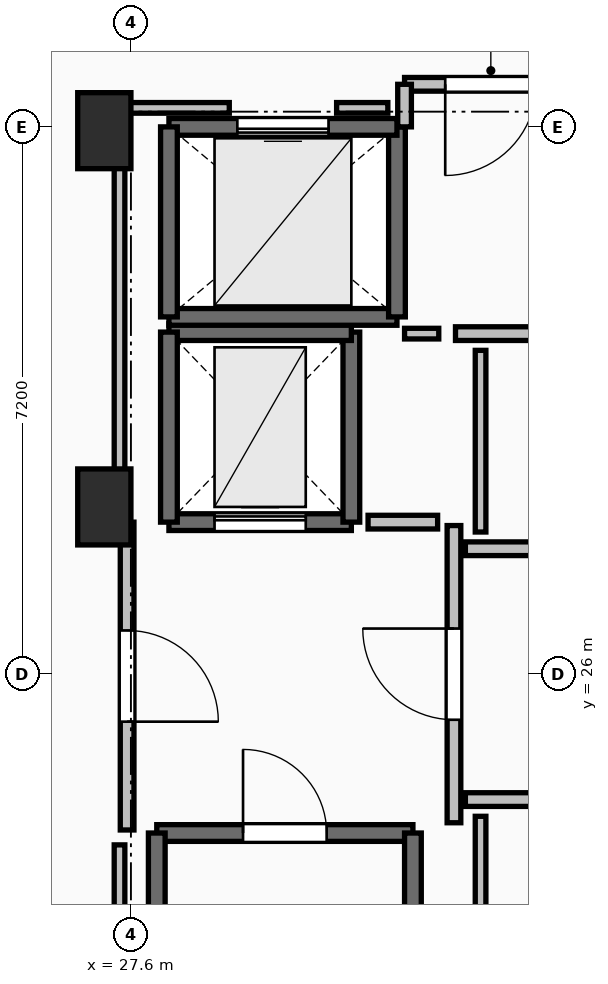
"""IFC4 building model, lengths in metres.
Left out: names, types, materials, properties, quantities, classifications, styles, units other than length and angle.
Written with IfcOpenShell. Run it as: python <this file> out.ifc"""

import sys

from ifc_helpers import new_model, si_unit, direction, frame, frame_2d, origin, origin_2d, place, context, subcontext, project, spatial, rectangle, extrude, element, fill, save


model = new_model("IFC4")
c1 = context("Model", 3, precision=1e-05, world=origin(), true_north=direction((0.0, 1.0)))
c2 = subcontext(c1, "Body", "Model", "MODEL_VIEW")
j1 = project(units=[si_unit("LENGTHUNIT", "METRE"), si_unit("PLANEANGLEUNIT", "RADIAN")], contexts=[c1])
p1 = place(None, origin())
s1 = spatial("IfcSite", under=j1, at=p1, CompositionType="ELEMENT")
p2 = place(p1, origin())
s2 = spatial("IfcBuilding", under=s1, at=p2, CompositionType="ELEMENT")
p3 = place(p2, frame((0.0, 0.0, 241.35)))
s3 = spatial("IfcBuildingStorey", under=s2, at=p3, CompositionType="ELEMENT", Elevation=241.35)
for number, where, z_axis, x_axis in (
    (1, (27.25, 28.2, 0.0), (0.0, 0.0, 1.0), (1.0, 0.0, 0.0)),
    (2, (27.25, 33.15, 0.0), (0.0, 0.0, 1.0), (1.0, 0.0, 0.0)),
):
    element("IfcColumn", number, at=place(p3, frame(where, z_axis=z_axis, x_axis=x_axis)), inside=s3, PredefinedType="PILASTER", context=c2, shape_type="SweptSolid", body=[
        extrude(rectangle(XDim=0.7, YDim=1.0, at=origin_2d()), origin(), (0.0, 0.0, 1.0), 3.55),
    ])
p4 = place(p3, frame((27.94, 23.91, 0.0), z_axis=(0.0, 0.0, 1.0), x_axis=(1.0, 0.0, 0.0)))
e3 = element("IfcWall", 3, at=p4, inside=s3, PredefinedType="SOLIDWALL", context=c2, shape_type="SweptSolid", body=[
    extrude(rectangle(XDim=3.37, YDim=0.22, at=frame_2d((1.685, 0.0))), origin(), (0.0, 0.0, 1.0), 3.29),
])
p5 = place(p4, frame((1.135, 0.0, 0.0)))
e4 = element("IfcOpeningElement", 4, at=p5, cuts=e3, PredefinedType="OPENING", context=c2, shape_type="SweptSolid", body=[
    extrude(rectangle(XDim=1.1, YDim=2.15, at=frame_2d((0.55, 1.075))), frame((0.0, 0.125, 0.0), z_axis=(0.0, -1.0, 0.0), x_axis=(1.0, 0.0, 0.0)), (0.0, 0.0, 1.0), 0.25),
])
for number, where, z_axis, x_axis in (
    (5, (31.31, 23.91, 0.0), (0.0, 0.0, 1.0), (0.0, -1.0, 0.0)),
    (6, (27.94, 16.49, 0.0), (0.0, 0.0, 1.0), (0.0, 1.0, 0.0)),
):
    element("IfcWall", number, at=place(p3, frame(where, z_axis=z_axis, x_axis=x_axis)), inside=s3, PredefinedType="SOLIDWALL", context=c2, shape_type="SweptSolid", body=[
        extrude(rectangle(XDim=7.42, YDim=0.22, at=frame_2d((3.71, 0.0))), origin(), (0.0, 0.0, 1.0), 3.29),
    ])
p6 = place(p3, frame((28.1, 28.0, 0.0), z_axis=(0.0, 0.0, 1.0), x_axis=(1.0, 0.0, 0.0)))
e7 = element("IfcWall", 7, at=p6, inside=s3, PredefinedType="SHEAR", context=c2, shape_type="SweptSolid", body=[
    extrude(rectangle(XDim=2.4, YDim=0.22, at=frame_2d((1.2, 0.0))), origin(), (0.0, 0.0, 1.0), 3.29),
])
p7 = place(p6, frame((0.6, 0.0, 0.0)))
e8 = element("IfcOpeningElement", 8, at=p7, cuts=e7, PredefinedType="OPENING", context=c2, shape_type="SweptSolid", body=[
    extrude(rectangle(XDim=1.2, YDim=2.2, at=frame_2d((0.6, 1.1))), frame((0.0, 0.125, 0.0), z_axis=(0.0, -1.0, 0.0), x_axis=(1.0, 0.0, 0.0)), (0.0, 0.0, 1.0), 0.25),
])
p8 = place(p3, frame((30.5, 28.0, 0.0), z_axis=(0.0, 0.0, 1.0), x_axis=(0.0, 1.0, 0.0)))
e9 = element("IfcWall", 9, at=p8, inside=s3, PredefinedType="SHEAR", context=c2, shape_type="SweptSolid", body=[
    extrude(rectangle(XDim=2.5, YDim=0.22, at=frame_2d((1.25, 0.0))), origin(), (0.0, 0.0, 1.0), 3.29),
])
p9 = place(p3, frame((30.5, 30.5, 0.0), z_axis=(0.0, 0.0, 1.0), x_axis=(-1.0, 0.0, 0.0)))
e10 = element("IfcWall", 10, at=p9, inside=s3, PredefinedType="SHEAR", context=c2, shape_type="SweptSolid", body=[
    extrude(rectangle(XDim=2.4, YDim=0.22, at=frame_2d((1.2, 0.0))), origin(), (0.0, 0.0, 1.0), 3.29),
])
p10 = place(p3, frame((28.1, 30.5, 0.0), z_axis=(0.0, 0.0, 1.0), x_axis=(0.0, -1.0, 0.0)))
e11 = element("IfcWall", 11, at=p10, inside=s3, PredefinedType="SHEAR", context=c2, shape_type="SweptSolid", body=[
    extrude(rectangle(XDim=2.5, YDim=0.22, at=frame_2d((1.25, 0.0))), origin(), (0.0, 0.0, 1.0), 3.29),
])
p11 = place(p3, frame((28.1, 30.7, 0.0), z_axis=(0.0, 0.0, 1.0), x_axis=(1.0, 0.0, 0.0)))
e12 = element("IfcWall", 12, at=p11, inside=s3, PredefinedType="SOLIDWALL", context=c2, shape_type="SweptSolid", body=[
    extrude(rectangle(XDim=3.0, YDim=0.22, at=frame_2d((1.5, 0.0))), origin(), (0.0, 0.0, 1.0), 3.29),
])
p12 = place(p3, frame((31.1, 30.7, 0.0), z_axis=(0.0, 0.0, 1.0), x_axis=(0.0, 1.0, 0.0)))
e13 = element("IfcWall", 13, at=p12, inside=s3, PredefinedType="SOLIDWALL", context=c2, shape_type="SweptSolid", body=[
    extrude(rectangle(XDim=2.5, YDim=0.22, at=frame_2d((1.25, 0.0))), origin(), (0.0, 0.0, 1.0), 3.29),
])
p13 = place(p3, frame((31.1, 33.2, 0.0), z_axis=(0.0, 0.0, 1.0), x_axis=(-1.0, 0.0, 0.0)))
e14 = element("IfcWall", 14, at=p13, inside=s3, PredefinedType="SOLIDWALL", context=c2, shape_type="SweptSolid", body=[
    extrude(rectangle(XDim=3.0, YDim=0.22, at=frame_2d((1.5, 0.0))), origin(), (0.0, 0.0, 1.0), 3.29),
])
p14 = place(p13, frame((0.9, 0.0, 0.0)))
e15 = element("IfcOpeningElement", 15, at=p14, cuts=e14, PredefinedType="OPENING", context=c2, shape_type="SweptSolid", body=[
    extrude(rectangle(XDim=1.2, YDim=2.2, at=frame_2d((0.6, 1.1))), frame((0.0, 0.125, 0.0), z_axis=(0.0, -1.0, 0.0), x_axis=(1.0, 0.0, 0.0)), (0.0, 0.0, 1.0), 0.25),
])
p15 = place(p3, frame((28.1, 33.2, 0.0), z_axis=(0.0, 0.0, 1.0), x_axis=(0.0, -1.0, 0.0)))
e16 = element("IfcWall", 16, at=p15, inside=s3, PredefinedType="SOLIDWALL", context=c2, shape_type="SweptSolid", body=[
    extrude(rectangle(XDim=2.5, YDim=0.22, at=frame_2d((1.25, 0.0))), origin(), (0.0, 0.0, 1.0), 3.29),
])
p16 = place(p3, frame((31.85, 24.045, 0.0), z_axis=(0.0, 0.0, 1.0), x_axis=(0.0, 1.0, 0.0)))
e17 = element("IfcWall", 17, at=p16, inside=s3, PredefinedType="PARTITIONING", context=c2, shape_type="SweptSolid", body=[
    extrude(rectangle(XDim=3.91, YDim=0.18, at=frame_2d((1.955, 0.0))), origin(), (0.0, 0.0, 1.0), 3.29),
])
p17 = place(p16, frame((1.355, 0.0, 0.0)))
e18 = element("IfcOpeningElement", 18, at=p17, cuts=e17, PredefinedType="OPENING", context=c2, shape_type="SweptSolid", body=[
    extrude(rectangle(XDim=1.2, YDim=2.15, at=frame_2d((0.6, 1.075))), frame((0.0, 0.105, 0.0), z_axis=(0.0, -1.0, 0.0), x_axis=(1.0, 0.0, 0.0)), (0.0, 0.0, 1.0), 0.21),
])
p18 = place(p3, frame((27.55, 28.0, 0.0), z_axis=(0.0, 0.0, 1.0), x_axis=(0.0, -1.0, 0.0)))
e19 = element("IfcWall", 19, at=p18, inside=s3, PredefinedType="PARTITIONING", context=c2, shape_type="SweptSolid", body=[
    extrude(rectangle(XDim=4.05, YDim=0.18, at=frame_2d((2.025, 0.0))), origin(), (0.0, 0.0, 1.0), 3.29),
])
p19 = place(p18, frame((1.425, 0.0, 0.0)))
e20 = element("IfcOpeningElement", 20, at=p19, cuts=e19, PredefinedType="OPENING", context=c2, shape_type="SweptSolid", body=[
    extrude(rectangle(XDim=1.2, YDim=2.15, at=frame_2d((0.6, 1.075))), frame((0.0, 0.105, 0.0), z_axis=(0.0, -1.0, 0.0), x_axis=(1.0, 0.0, 0.0)), (0.0, 0.0, 1.0), 0.21),
])
p20 = place(p3, frame((31.87, 30.48, 0.0), z_axis=(0.0, 0.0, 1.0), x_axis=(1.0, 0.0, 0.0)))
e21 = element("IfcWall", 21, at=p20, inside=s3, PredefinedType="PARTITIONING", context=c2, shape_type="SweptSolid", body=[
    extrude(rectangle(XDim=1.6, YDim=0.18, at=frame_2d((0.8, 0.0))), origin(), (0.0, 0.0, 1.0), 3.29),
])
p21 = place(p3, frame((33.47, 33.76, 0.0), z_axis=(0.0, 0.0, 1.0), x_axis=(-1.0, 0.0, 0.0)))
e22 = element("IfcWall", 22, at=p21, inside=s3, PredefinedType="PARTITIONING", context=c2, shape_type="SweptSolid", body=[
    extrude(rectangle(XDim=2.27, YDim=0.18, at=frame_2d((1.135, 0.0))), origin(), (0.0, 0.0, 1.0), 3.29),
])
p22 = place(p21, frame((0.535, 0.0, 0.0)))
e23 = element("IfcOpeningElement", 23, at=p22, cuts=e22, PredefinedType="OPENING", context=c2, shape_type="SweptSolid", body=[
    extrude(rectangle(XDim=1.2, YDim=2.15, at=frame_2d((0.6, 1.075))), frame((0.0, 0.105, 0.0), z_axis=(0.0, -1.0, 0.0), x_axis=(1.0, 0.0, 0.0)), (0.0, 0.0, 1.0), 0.21),
])
p23 = place(p3, frame((31.2, 33.76, 0.0), z_axis=(0.0, 0.0, 1.0), x_axis=(0.0, -1.0, 0.0)))
e24 = element("IfcWall", 24, at=p23, inside=s3, PredefinedType="PARTITIONING", context=c2, shape_type="SweptSolid", body=[
    extrude(rectangle(XDim=0.56, YDim=0.18, at=frame_2d((0.28, 0.0))), origin(), (0.0, 0.0, 1.0), 3.29),
])
p24 = place(p3, frame((39.19, 27.65, 0.0), z_axis=(0.0, 0.0, 1.0), x_axis=(-1.0, 0.0, 0.0)))
e25 = element("IfcWall", 25, at=p24, inside=s3, PredefinedType="PARTITIONING", context=c2, shape_type="SweptSolid", body=[
    extrude(rectangle(XDim=7.19, YDim=0.18, at=frame_2d((3.595, 0.0))), origin(), (0.0, 0.0, 1.0), 3.29),
])
p25 = place(p24, frame((3.095, 0.0, 0.0)))
e26 = element("IfcOpeningElement", 26, at=p25, cuts=e25, PredefinedType="OPENING", context=c2, shape_type="SweptSolid", body=[
    extrude(rectangle(XDim=1.0, YDim=2.15, at=frame_2d((0.5, 1.075))), frame((0.0, 0.105, 0.0), z_axis=(0.0, -1.0, 0.0), x_axis=(1.0, 0.0, 0.0)), (0.0, 0.0, 1.0), 0.21),
])
p26 = place(p3, frame((32.0, 24.35, 0.0), z_axis=(0.0, 0.0, 1.0), x_axis=(1.0, 0.0, 0.0)))
e27 = element("IfcWall", 27, at=p26, inside=s3, PredefinedType="PARTITIONING", context=c2, shape_type="SweptSolid", body=[
    extrude(rectangle(XDim=3.04, YDim=0.18, at=frame_2d((1.52, 0.0))), origin(), (0.0, 0.0, 1.0), 3.29),
])
p27 = place(p26, frame((1.095, 0.0, 0.0)))
e28 = element("IfcOpeningElement", 28, at=p27, cuts=e27, PredefinedType="OPENING", context=c2, shape_type="SweptSolid", body=[
    extrude(rectangle(XDim=0.85, YDim=2.1, at=frame_2d((0.425, 1.05))), frame((0.0, 0.105, 0.0), z_axis=(0.0, -1.0, 0.0), x_axis=(1.0, 0.0, 0.0)), (0.0, 0.0, 1.0), 0.21),
])
p28 = place(p3, frame((31.635, 28.0, 0.0), z_axis=(0.0, 0.0, 1.0), x_axis=(-1.0, 0.0, 0.0)))
e29 = element("IfcWall", 29, at=p28, inside=s3, PredefinedType="PARTITIONING", context=c2, shape_type="SweptSolid", body=[
    extrude(rectangle(XDim=0.915, YDim=0.18, at=frame_2d((0.458, 0.0))), origin(), (0.0, 0.0, 1.0), 3.29),
])
p29 = place(p3, frame((31.2, 30.48, 0.0), z_axis=(0.0, 0.0, 1.0), x_axis=(1.0, 0.0, 0.0)))
e30 = element("IfcWall", 30, at=p29, inside=s3, PredefinedType="PARTITIONING", context=c2, shape_type="SweptSolid", body=[
    extrude(rectangle(XDim=0.45, YDim=0.14, at=frame_2d((0.225, 0.0))), origin(), (0.0, 0.0, 1.0), 3.29),
])
p30 = place(p3, frame((32.2, 30.26, 0.0), z_axis=(0.0, 0.0, 1.0), x_axis=(0.0, -1.0, 0.0)))
e31 = element("IfcWall", 31, at=p30, inside=s3, PredefinedType="PARTITIONING", context=c2, shape_type="SweptSolid", body=[
    extrude(rectangle(XDim=2.39, YDim=0.14, at=frame_2d((1.195, 0.0))), origin(), (0.0, 0.0, 1.0), 3.29),
])
p31 = place(p3, frame((32.2, 24.13, 0.0), z_axis=(0.0, 0.0, 1.0), x_axis=(0.0, -1.0, 0.0)))
e32 = element("IfcWall", 32, at=p31, inside=s3, PredefinedType="PARTITIONING", context=c2, shape_type="SweptSolid", body=[
    extrude(rectangle(XDim=2.46, YDim=0.14, at=frame_2d((1.23, 0.0))), origin(), (0.0, 0.0, 1.0), 2.482),
])
p32 = place(p3, frame((30.98, 33.45, 0.0), z_axis=(0.0, 0.0, 1.0), x_axis=(-1.0, 0.0, 0.0)))
e33 = element("IfcWall", 33, at=p32, inside=s3, PredefinedType="PARTITIONING", context=c2, shape_type="SweptSolid", body=[
    extrude(rectangle(XDim=0.674, YDim=0.14, at=frame_2d((0.337, 0.0))), origin(), (0.0, 0.0, 1.0), 3.29),
])
p33 = place(p3, frame((28.894, 33.45, 0.0), z_axis=(0.0, 0.0, 1.0), x_axis=(-1.0, 0.0, 0.0)))
e34 = element("IfcWall", 34, at=p33, inside=s3, PredefinedType="PARTITIONING", context=c2, shape_type="SweptSolid", body=[
    extrude(rectangle(XDim=1.444, YDim=0.14, at=frame_2d((0.722, 0.0))), origin(), (0.0, 0.0, 1.0), 2.482),
])
p34 = place(p3, frame((27.45, 33.45, 0.0), z_axis=(0.0, 0.0, 1.0), x_axis=(0.0, -1.0, 0.0)))
e35 = element("IfcWall", 35, at=p34, inside=s3, PredefinedType="PARTITIONING", context=c2, shape_type="SweptSolid", body=[
    extrude(rectangle(XDim=5.254, YDim=0.14, at=frame_2d((2.627, 0.0))), origin(), (0.0, 0.0, 1.0), 2.482),
])
p35 = place(p3, frame((27.45, 23.754, 0.0), z_axis=(0.0, 0.0, 1.0), x_axis=(0.0, -1.0, 0.0)))
e36 = element("IfcWall", 36, at=p35, inside=s3, PredefinedType="PARTITIONING", context=c2, shape_type="SweptSolid", body=[
    extrude(rectangle(XDim=7.514, YDim=0.14, at=frame_2d((3.757, 0.0))), origin(), (0.0, 0.0, 1.0), 2.482),
])
p36 = place(p5, origin())
e37 = element("IfcDoor", 37, at=p36, inside=s3, OperationType="SINGLE_SWING_LEFT", PredefinedType="DOOR", context=c2, shape_type="SweptSolid", body=[
    extrude(rectangle(XDim=1.1, YDim=2.15, at=frame_2d((0.55, 1.075))), frame((0.0, 0.025, 0.0), z_axis=(0.0, -1.0, 0.0), x_axis=(1.0, 0.0, 0.0)), (0.0, 0.0, 1.0), 0.05),
])
fill(e4, e37)
p37 = place(p7, origin())
e38 = element("IfcDoor", 38, at=p37, inside=s3, OperationType="SLIDING_TO_LEFT", PredefinedType="DOOR", context=c2, shape_type="SweptSolid", body=[
    extrude(rectangle(XDim=1.2, YDim=2.2, at=frame_2d((0.6, 1.1))), frame((0.0, 0.025, 0.0), z_axis=(0.0, -1.0, 0.0), x_axis=(1.0, 0.0, 0.0)), (0.0, 0.0, 1.0), 0.05),
])
fill(e8, e38)
p38 = place(p14, origin())
e39 = element("IfcDoor", 39, at=p38, inside=s3, OperationType="SLIDING_TO_LEFT", PredefinedType="DOOR", context=c2, shape_type="SweptSolid", body=[
    extrude(rectangle(XDim=1.2, YDim=2.2, at=frame_2d((0.6, 1.1))), frame((0.0, 0.025, 0.0), z_axis=(0.0, -1.0, 0.0), x_axis=(1.0, 0.0, 0.0)), (0.0, 0.0, 1.0), 0.05),
])
fill(e15, e39)
p39 = place(p17, origin())
e40 = element("IfcDoor", 40, at=p39, inside=s3, OperationType="SINGLE_SWING_RIGHT", PredefinedType="DOOR", context=c2, shape_type="SweptSolid", body=[
    extrude(rectangle(XDim=1.2, YDim=2.15, at=frame_2d((0.6, 1.075))), frame((0.0, 0.025, 0.0), z_axis=(0.0, -1.0, 0.0), x_axis=(1.0, 0.0, 0.0)), (0.0, 0.0, 1.0), 0.05),
])
fill(e18, e40)
p40 = place(p19, origin())
e41 = element("IfcDoor", 41, at=p40, inside=s3, OperationType="SINGLE_SWING_RIGHT", PredefinedType="DOOR", context=c2, shape_type="SweptSolid", body=[
    extrude(rectangle(XDim=1.2, YDim=2.15, at=frame_2d((0.6, 1.075))), frame((0.0, 0.025, 0.0), z_axis=(0.0, -1.0, 0.0), x_axis=(1.0, 0.0, 0.0)), (0.0, 0.0, 1.0), 0.05),
])
fill(e20, e41)
p41 = place(p22, origin())
e42 = element("IfcDoor", 42, at=p41, inside=s3, OperationType="SINGLE_SWING_RIGHT", PredefinedType="DOOR", context=c2, shape_type="SweptSolid", body=[
    extrude(rectangle(XDim=1.2, YDim=2.15, at=frame_2d((0.6, 1.075))), frame((0.0, 0.025, 0.0), z_axis=(0.0, -1.0, 0.0), x_axis=(1.0, 0.0, 0.0)), (0.0, 0.0, 1.0), 0.05),
])
fill(e23, e42)
save(model, sys.argv[1])
